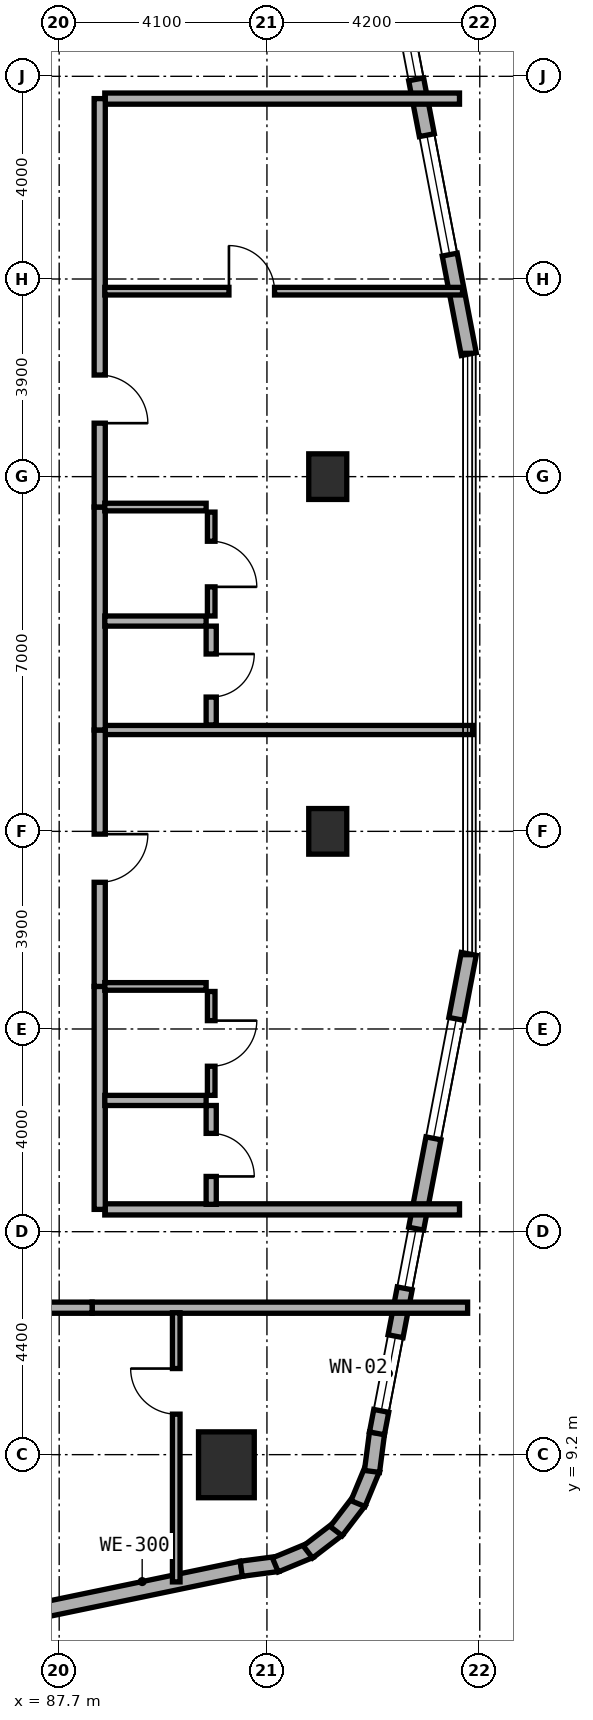
"""IFC4 building model, lengths in metres.
Left out: names, types, materials, properties, quantities, classifications, styles, units other than length and angle.
Written with IfcOpenShell. Run it as: python <this file> out.ifc"""

import sys

from ifc_helpers import new_model, si_unit, direction, frame, frame_2d, origin, origin_2d, place, context, subcontext, project, spatial, rectangle, extrude, element, fill, save


model = new_model("IFC4")
c1 = context("Model", 3, precision=1e-05, world=origin(), true_north=direction((0.0, 1.0)))
c2 = subcontext(c1, "Body", "Model", "MODEL_VIEW")
j1 = project(units=[si_unit("LENGTHUNIT", "METRE"), si_unit("PLANEANGLEUNIT", "RADIAN")], contexts=[c1])
p1 = place(None, origin())
s1 = spatial("IfcSite", under=j1, at=p1, CompositionType="ELEMENT")
p2 = place(p1, origin())
s2 = spatial("IfcBuilding", under=s1, at=p2, CompositionType="ELEMENT")
p3 = place(p2, frame((0.0, 0.0, 27.5)))
s3 = spatial("IfcBuildingStorey", under=s2, at=p3, CompositionType="ELEMENT", Elevation=27.5)
for number, where, z_axis, x_axis in (
    (1, (93.0, 21.5, 0.0), (0.0, 0.0, 1.0), (1.0, 0.0, 0.0)),
    (2, (93.0, 28.5, 0.0), (0.0, 0.0, 1.0), (1.0, 0.0, 0.0)),
):
    element("IfcColumn", number, at=place(p3, frame(where, z_axis=z_axis, x_axis=x_axis)), inside=s3, PredefinedType="COLUMN", context=c2, shape_type="SweptSolid", body=[
        extrude(rectangle(XDim=0.75, YDim=0.9, at=origin_2d()), origin(), (0.0, 0.0, 1.0), 3.5),
    ])
p4 = place(p3, frame((91.0, 9.0, 0.0), z_axis=(0.0, 0.0, 1.0), x_axis=(1.0, 0.0, 0.0)))
e3 = element("IfcColumn", 3, at=p4, inside=s3, PredefinedType="COLUMN", context=c2, shape_type="SweptSolid", body=[
    extrude(rectangle(XDim=1.1, YDim=1.3, at=origin_2d()), origin(), (0.0, 0.0, 1.0), 3.5),
])
p5 = place(p3, frame((82.594, 5.142, 0.0), z_axis=(0.0, 0.0, 1.0), x_axis=(0.979125485139, 0.203256695712, 0.0)))
e4 = element("IfcWall", 4, at=p5, inside=s3, PredefinedType="STANDARD", context=c2, shape_type="SweptSolid", body=[
    extrude(rectangle(XDim=8.89, YDim=0.3, at=frame_2d((4.445, 0.0))), origin(), (0.0, 0.0, 1.0), 3.25),
])
p6 = place(p5, frame((2.548, 0.0, 0.8)))
e5 = element("IfcOpeningElement", 5, at=p6, cuts=e4, PredefinedType="OPENING", context=c2, shape_type="SweptSolid", body=[
    extrude(rectangle(XDim=2.4, YDim=1.6, at=frame_2d((1.2, 0.8))), frame((0.0, 0.16, 0.0), z_axis=(0.0, -1.0, 0.0), x_axis=(1.0, 0.0, 0.0)), (0.0, 0.0, 1.0), 0.32),
])
p7 = place(p3, frame((91.293, 6.948, 0.0), z_axis=(0.0, 0.0, 1.0), x_axis=(0.991486167159, 0.13021205909, 0.0)))
e6 = element("IfcWall", 6, at=p7, inside=s3, PredefinedType="STANDARD", context=c2, shape_type="SweptSolid", body=[
    extrude(rectangle(XDim=0.729, YDim=0.3, at=frame_2d((0.365, 0.0))), origin(), (0.0, 0.0, 1.0), 3.25),
])
for number, where, z_axis, x_axis in (
    (7, (91.965, 7.024, 0.0), (0.0, 0.0, 1.0), (0.924, 0.384, 0.0)),
    (8, (92.609, 7.279, 0.0), (0.0, 0.0, 1.0), (0.794, 0.608, 0.0)),
    (9, (93.166, 7.691, 0.0), (0.0, 0.0, 1.0), (0.609, 0.793, 0.0)),
):
    element("IfcWall", number, at=place(p3, frame(where, z_axis=z_axis, x_axis=x_axis)), inside=s3, PredefinedType="STANDARD", context=c2, shape_type="SweptSolid", body=[
        extrude(rectangle(XDim=0.746, YDim=0.3, at=frame_2d((0.373, 0.0))), origin(), (0.0, 0.0, 1.0), 3.25),
    ])
p8 = place(p3, frame((93.596, 8.234, 0.0), z_axis=(0.0, 0.0, 1.0), x_axis=(0.383430326427, 0.923569805037, 0.0)))
e10 = element("IfcWall", 10, at=p8, inside=s3, PredefinedType="STANDARD", context=c2, shape_type="SweptSolid", body=[
    extrude(rectangle(XDim=0.746, YDim=0.3, at=frame_2d((0.373, 0.0))), origin(), (0.0, 0.0, 1.0), 3.25),
])
p9 = place(p3, frame((93.873, 8.869, 0.0), z_axis=(0.0, 0.0, 1.0), x_axis=(0.129339184068, 0.991600411186, 0.0)))
e11 = element("IfcWall", 11, at=p9, inside=s3, PredefinedType="STANDARD", context=c2, shape_type="SweptSolid", body=[
    extrude(rectangle(XDim=0.764, YDim=0.3, at=frame_2d((0.382, 0.0))), origin(), (0.0, 0.0, 1.0), 3.25),
])
p10 = place(p3, frame((93.971, 9.62, 0.0), z_axis=(0.0, 0.0, 1.0), x_axis=(0.188087874316, 0.982152203854, 0.0)))
e12 = element("IfcWall", 12, at=p10, inside=s3, PredefinedType="STANDARD", context=c2, shape_type="SweptSolid", body=[
    extrude(rectangle(XDim=9.634, YDim=0.3, at=frame_2d((4.817, 0.0))), origin(), (0.0, 0.0, 1.0), 3.25),
])
p11 = place(p10, frame((0.452, 0.0, 0.85)))
e13 = element("IfcOpeningElement", 13, at=p11, cuts=e12, PredefinedType="OPENING", context=c2, shape_type="SweptSolid", body=[
    extrude(rectangle(XDim=1.5, YDim=1.5, at=frame_2d((0.75, 0.75))), frame((0.0, 0.16, 0.0), z_axis=(0.0, -1.0, 0.0), x_axis=(1.0, 0.0, 0.0)), (0.0, 0.0, 1.0), 0.32),
])
p12 = place(p10, frame((2.913, 0.0, 0.85)))
e14 = element("IfcOpeningElement", 14, at=p12, cuts=e12, PredefinedType="OPENING", context=c2, shape_type="SweptSolid", body=[
    extrude(rectangle(XDim=1.2, YDim=1.5, at=frame_2d((0.6, 0.75))), frame((0.0, 0.16, 0.0), z_axis=(0.0, -1.0, 0.0), x_axis=(1.0, 0.0, 0.0)), (0.0, 0.0, 1.0), 0.32),
])
p13 = place(p10, frame((5.928, 0.0, 0.8)))
e15 = element("IfcOpeningElement", 15, at=p13, cuts=e12, PredefinedType="OPENING", context=c2, shape_type="SweptSolid", body=[
    extrude(rectangle(XDim=2.4, YDim=1.6, at=frame_2d((1.2, 0.8))), frame((0.0, 0.16, 0.0), z_axis=(0.0, -1.0, 0.0), x_axis=(1.0, 0.0, 0.0)), (0.0, 0.0, 1.0), 0.32),
])
p14 = place(p3, frame((95.783, 30.918, 0.0), z_axis=(0.0, 0.0, 1.0), x_axis=(-0.188087874316, 0.982152203854, 0.0)))
e16 = element("IfcWall", 16, at=p14, inside=s3, PredefinedType="STANDARD", context=c2, shape_type="SweptSolid", body=[
    extrude(rectangle(XDim=9.634, YDim=0.3, at=frame_2d((4.817, 0.0))), origin(), (0.0, 0.0, 1.0), 3.25),
])
p15 = place(p14, frame((1.999, 0.0, 0.8)))
e17 = element("IfcOpeningElement", 17, at=p15, cuts=e16, PredefinedType="OPENING", context=c2, shape_type="SweptSolid", body=[
    extrude(rectangle(XDim=2.4, YDim=1.6, at=frame_2d((1.2, 0.8))), frame((0.0, 0.16, 0.0), z_axis=(0.0, -1.0, 0.0), x_axis=(1.0, 0.0, 0.0)), (0.0, 0.0, 1.0), 0.32),
])
p16 = place(p14, frame((5.521, 0.0, 0.85)))
e18 = element("IfcOpeningElement", 18, at=p16, cuts=e16, PredefinedType="OPENING", context=c2, shape_type="SweptSolid", body=[
    extrude(rectangle(XDim=1.2, YDim=1.5, at=frame_2d((0.6, 0.75))), frame((0.0, 0.16, 0.0), z_axis=(0.0, -1.0, 0.0), x_axis=(1.0, 0.0, 0.0)), (0.0, 0.0, 1.0), 0.32),
])
p17 = place(p14, frame((7.682, 0.0, 0.85)))
e19 = element("IfcOpeningElement", 19, at=p17, cuts=e16, PredefinedType="OPENING", context=c2, shape_type="SweptSolid", body=[
    extrude(rectangle(XDim=1.5, YDim=1.5, at=frame_2d((0.75, 0.75))), frame((0.0, 0.16, 0.0), z_axis=(0.0, -1.0, 0.0), x_axis=(1.0, 0.0, 0.0)), (0.0, 0.0, 1.0), 0.32),
])
p18 = place(p3, frame((88.35, 12.1, 0.0), z_axis=(0.0, 0.0, 1.0), x_axis=(1.0, 0.0, 0.0)))
e20 = element("IfcWall", 20, at=p18, inside=s3, PredefinedType="SOLIDWALL", context=c2, shape_type="SweptSolid", body=[
    extrude(rectangle(XDim=7.41, YDim=0.22, at=frame_2d((3.705, 0.0))), origin(), (0.0, 0.0, 1.0), 2.865),
])
p19 = place(p3, frame((79.28, 12.1, 0.0), z_axis=(0.0, 0.0, 1.0), x_axis=(1.0, 0.0, 0.0)))
e21 = element("IfcWall", 21, at=p19, inside=s3, PredefinedType="SOLIDWALL", context=c2, shape_type="SweptSolid", body=[
    extrude(rectangle(XDim=9.07, YDim=0.22, at=frame_2d((4.535, 0.0))), origin(), (0.0, 0.0, 1.0), 2.725),
])
p20 = place(p19, frame((4.06, 0.0, 0.0)))
e22 = element("IfcOpeningElement", 22, at=p20, cuts=e21, PredefinedType="OPENING", context=c2, shape_type="SweptSolid", body=[
    extrude(rectangle(XDim=0.95, YDim=2.1, at=frame_2d((0.475, 1.05))), frame((0.0, 0.12, 0.0), z_axis=(0.0, -1.0, 0.0), x_axis=(1.0, 0.0, 0.0)), (0.0, 0.0, 1.0), 0.24),
])
p21 = place(p3, frame((90.01, 6.689, 0.0), z_axis=(0.0, 0.0, 1.0), x_axis=(0.0, 1.0, 0.0)))
e23 = element("IfcWall", 23, at=p21, inside=s3, PredefinedType="PARTITIONING", context=c2, shape_type="SweptSolid", body=[
    extrude(rectangle(XDim=5.311, YDim=0.15, at=frame_2d((2.656, 0.0))), origin(), (0.0, 0.0, 1.0), 2.865),
])
p22 = place(p21, frame((3.31, 0.0, 0.0)))
e24 = element("IfcOpeningElement", 24, at=p22, cuts=e23, PredefinedType="OPENING", context=c2, shape_type="SweptSolid", body=[
    extrude(rectangle(XDim=0.9, YDim=2.1, at=frame_2d((0.45, 1.05))), frame((0.0, 0.085, 0.0), z_axis=(0.0, -1.0, 0.0), x_axis=(1.0, 0.0, 0.0)), (0.0, 0.0, 1.0), 0.17),
])
for number, where, z_axis, x_axis in (
    (25, (88.6, 14.04, 0.0), (0.0, 0.0, 1.0), (1.0, 0.0, 0.0)),
    (26, (88.6, 35.96, 0.0), (0.0, 0.0, 1.0), (1.0, 0.0, 0.0)),
):
    element("IfcWall", number, at=place(p3, frame(where, z_axis=z_axis, x_axis=x_axis)), inside=s3, PredefinedType="SOLIDWALL", context=c2, shape_type="SweptSolid", body=[
        extrude(rectangle(XDim=7.0, YDim=0.22, at=frame_2d((3.5, 0.0))), origin(), (0.0, 0.0, 1.0), 2.865),
    ])
p23 = place(p3, frame((88.5, 23.5, 0.0), z_axis=(0.0, 0.0, 1.0), x_axis=(1.0, 0.0, 0.0)))
e27 = element("IfcWall", 27, at=p23, inside=s3, PredefinedType="SOLIDWALL", context=c2, shape_type="SweptSolid", body=[
    extrude(rectangle(XDim=7.36, YDim=0.18, at=frame_2d((3.68, 0.0))), origin(), (0.0, 0.0, 1.0), 2.865),
])
p24 = place(p3, frame((88.5, 14.04, 0.0), z_axis=(0.0, 0.0, 1.0), x_axis=(0.0, 1.0, 0.0)))
e28 = element("IfcWall", 28, at=p24, inside=s3, PredefinedType="SOLIDWALL", context=c2, shape_type="SweptSolid", body=[
    extrude(rectangle(XDim=4.4, YDim=0.22, at=frame_2d((2.2, 0.0))), origin(), (0.0, 0.0, 1.0), 3.22),
])
p25 = place(p3, frame((88.5, 18.44, 0.0), z_axis=(0.0, 0.0, 1.0), x_axis=(0.0, 1.0, 0.0)))
e29 = element("IfcWall", 29, at=p25, inside=s3, PredefinedType="SOLIDWALL", context=c2, shape_type="SweptSolid", body=[
    extrude(rectangle(XDim=5.06, YDim=0.22, at=frame_2d((2.53, 0.0))), origin(), (0.0, 0.0, 1.0), 2.725),
])
p26 = place(p25, frame((2.055, 0.0, 0.0)))
e30 = element("IfcOpeningElement", 30, at=p26, cuts=e29, PredefinedType="OPENING", context=c2, shape_type="SweptSolid", body=[
    extrude(rectangle(XDim=0.95, YDim=2.1, at=frame_2d((0.475, 1.05))), frame((0.0, 0.12, 0.0), z_axis=(0.0, -1.0, 0.0), x_axis=(1.0, 0.0, 0.0)), (0.0, 0.0, 1.0), 0.24),
])
p27 = place(p3, frame((88.6, 16.19, 0.0), z_axis=(0.0, 0.0, 1.0), x_axis=(1.0, 0.0, 0.0)))
e31 = element("IfcWall", 31, at=p27, inside=s3, PredefinedType="PLUMBINGWALL", context=c2, shape_type="SweptSolid", body=[
    extrude(rectangle(XDim=2.0, YDim=0.2, at=frame_2d((1.0, 0.0))), origin(), (0.0, 0.0, 1.0), 3.22),
])
p28 = place(p3, frame((88.6, 18.44, 0.0), z_axis=(0.0, 0.0, 1.0), x_axis=(1.0, 0.0, 0.0)))
e32 = element("IfcWall", 32, at=p28, inside=s3, PredefinedType="PARTITIONING", context=c2, shape_type="SweptSolid", body=[
    extrude(rectangle(XDim=2.0, YDim=0.15, at=frame_2d((1.0, 0.0))), origin(), (0.0, 0.0, 1.0), 3.22),
])
p29 = place(p3, frame((90.7, 14.14, 0.0), z_axis=(0.0, 0.0, 1.0), x_axis=(0.0, 1.0, 0.0)))
e33 = element("IfcWall", 33, at=p29, inside=s3, PredefinedType="PLUMBINGWALL", context=c2, shape_type="SweptSolid", body=[
    extrude(rectangle(XDim=1.95, YDim=0.2, at=frame_2d((0.975, 0.0))), origin(), (0.0, 0.0, 1.0), 3.22),
])
p30 = place(p29, frame((0.55, 0.0, 0.0)))
e34 = element("IfcOpeningElement", 34, at=p30, cuts=e33, PredefinedType="OPENING", context=c2, shape_type="SweptSolid", body=[
    extrude(rectangle(XDim=0.85, YDim=2.1, at=frame_2d((0.425, 1.05))), frame((0.0, 0.11, 0.0), z_axis=(0.0, -1.0, 0.0), x_axis=(1.0, 0.0, 0.0)), (0.0, 0.0, 1.0), 0.22),
])
p31 = place(p3, frame((90.7, 16.29, 0.0), z_axis=(0.0, 0.0, 1.0), x_axis=(0.0, 1.0, 0.0)))
e35 = element("IfcWall", 35, at=p31, inside=s3, PredefinedType="PARTITIONING", context=c2, shape_type="SweptSolid", body=[
    extrude(rectangle(XDim=2.05, YDim=0.15, at=frame_2d((1.025, 0.0))), origin(), (0.0, 0.0, 1.0), 3.22),
])
p32 = place(p31, frame((0.575, 0.0, 0.0)))
e36 = element("IfcOpeningElement", 36, at=p32, cuts=e35, PredefinedType="OPENING", context=c2, shape_type="SweptSolid", body=[
    extrude(rectangle(XDim=0.9, YDim=2.1, at=frame_2d((0.45, 1.05))), frame((0.0, 0.085, 0.0), z_axis=(0.0, -1.0, 0.0), x_axis=(1.0, 0.0, 0.0)), (0.0, 0.0, 1.0), 0.17),
])
p33 = place(p3, frame((88.5, 23.5, 0.0), z_axis=(0.0, 0.0, 1.0), x_axis=(0.0, 1.0, 0.0)))
e37 = element("IfcWall", 37, at=p33, inside=s3, PredefinedType="SOLIDWALL", context=c2, shape_type="SweptSolid", body=[
    extrude(rectangle(XDim=4.4, YDim=0.22, at=frame_2d((2.2, 0.0))), origin(), (0.0, 0.0, 1.0), 3.22),
])
p34 = place(p3, frame((88.5, 27.9, 0.0), z_axis=(0.0, 0.0, 1.0), x_axis=(0.0, 1.0, 0.0)))
e38 = element("IfcWall", 38, at=p34, inside=s3, PredefinedType="SOLIDWALL", context=c2, shape_type="SweptSolid", body=[
    extrude(rectangle(XDim=8.06, YDim=0.22, at=frame_2d((4.03, 0.0))), origin(), (0.0, 0.0, 1.0), 2.725),
])
p35 = place(p34, frame((1.655, 0.0, 0.0)))
e39 = element("IfcOpeningElement", 39, at=p35, cuts=e38, PredefinedType="OPENING", context=c2, shape_type="SweptSolid", body=[
    extrude(rectangle(XDim=0.95, YDim=2.1, at=frame_2d((0.475, 1.05))), frame((0.0, 0.12, 0.0), z_axis=(0.0, -1.0, 0.0), x_axis=(1.0, 0.0, 0.0)), (0.0, 0.0, 1.0), 0.24),
])
p36 = place(p3, frame((88.6, 32.16, 0.0), z_axis=(0.0, 0.0, 1.0), x_axis=(1.0, 0.0, 0.0)))
e40 = element("IfcWall", 40, at=p36, inside=s3, PredefinedType="PARTITIONING", context=c2, shape_type="SweptSolid", body=[
    extrude(rectangle(XDim=7.06, YDim=0.15, at=frame_2d((3.53, 0.0))), origin(), (0.0, 0.0, 1.0), 2.865),
])
p37 = place(p36, frame((2.45, 0.0, 0.0)))
e41 = element("IfcOpeningElement", 41, at=p37, cuts=e40, PredefinedType="OPENING", context=c2, shape_type="SweptSolid", body=[
    extrude(rectangle(XDim=0.9, YDim=2.1, at=frame_2d((0.45, 1.05))), frame((0.0, 0.085, 0.0), z_axis=(0.0, -1.0, 0.0), x_axis=(1.0, 0.0, 0.0)), (0.0, 0.0, 1.0), 0.17),
])
p38 = place(p3, frame((88.6, 25.65, 0.0), z_axis=(0.0, 0.0, 1.0), x_axis=(1.0, 0.0, 0.0)))
e42 = element("IfcWall", 42, at=p38, inside=s3, PredefinedType="PLUMBINGWALL", context=c2, shape_type="SweptSolid", body=[
    extrude(rectangle(XDim=2.0, YDim=0.2, at=frame_2d((1.0, 0.0))), origin(), (0.0, 0.0, 1.0), 3.22),
])
p39 = place(p3, frame((88.6, 27.9, 0.0), z_axis=(0.0, 0.0, 1.0), x_axis=(1.0, 0.0, 0.0)))
e43 = element("IfcWall", 43, at=p39, inside=s3, PredefinedType="PARTITIONING", context=c2, shape_type="SweptSolid", body=[
    extrude(rectangle(XDim=2.0, YDim=0.15, at=frame_2d((1.0, 0.0))), origin(), (0.0, 0.0, 1.0), 3.22),
])
p40 = place(p3, frame((90.7, 23.6, 0.0), z_axis=(0.0, 0.0, 1.0), x_axis=(0.0, 1.0, 0.0)))
e44 = element("IfcWall", 44, at=p40, inside=s3, PredefinedType="PLUMBINGWALL", context=c2, shape_type="SweptSolid", body=[
    extrude(rectangle(XDim=1.95, YDim=0.2, at=frame_2d((0.975, 0.0))), origin(), (0.0, 0.0, 1.0), 3.22),
])
p41 = place(p40, frame((0.55, 0.0, 0.0)))
e45 = element("IfcOpeningElement", 45, at=p41, cuts=e44, PredefinedType="OPENING", context=c2, shape_type="SweptSolid", body=[
    extrude(rectangle(XDim=0.85, YDim=2.1, at=frame_2d((0.425, 1.05))), frame((0.0, 0.11, 0.0), z_axis=(0.0, -1.0, 0.0), x_axis=(1.0, 0.0, 0.0)), (0.0, 0.0, 1.0), 0.22),
])
p42 = place(p3, frame((90.7, 25.75, 0.0), z_axis=(0.0, 0.0, 1.0), x_axis=(0.0, 1.0, 0.0)))
e46 = element("IfcWall", 46, at=p42, inside=s3, PredefinedType="PARTITIONING", context=c2, shape_type="SweptSolid", body=[
    extrude(rectangle(XDim=2.05, YDim=0.15, at=frame_2d((1.025, 0.0))), origin(), (0.0, 0.0, 1.0), 3.22),
])
p43 = place(p42, frame((0.575, 0.0, 0.0)))
e47 = element("IfcOpeningElement", 47, at=p43, cuts=e46, PredefinedType="OPENING", context=c2, shape_type="SweptSolid", body=[
    extrude(rectangle(XDim=0.9, YDim=2.1, at=frame_2d((0.45, 1.05))), frame((0.0, 0.085, 0.0), z_axis=(0.0, -1.0, 0.0), x_axis=(1.0, 0.0, 0.0)), (0.0, 0.0, 1.0), 0.17),
])
p44 = place(p11, origin())
e48 = element("IfcWindow", 48, at=p44, inside=s3, PartitioningType="SINGLE_PANEL", PredefinedType="WINDOW", context=c2, shape_type="SweptSolid", body=[
    extrude(rectangle(XDim=1.5, YDim=1.5, at=frame_2d((0.75, 0.75))), frame((0.0, 0.03, 0.0), z_axis=(0.0, -1.0, 0.0), x_axis=(1.0, 0.0, 0.0)), (0.0, 0.0, 1.0), 0.06),
])
fill(e13, e48)
p45 = place(p12, origin())
e49 = element("IfcWindow", 49, at=p45, inside=s3, PartitioningType="SINGLE_PANEL", PredefinedType="WINDOW", context=c2, shape_type="SweptSolid", body=[
    extrude(rectangle(XDim=1.2, YDim=1.5, at=frame_2d((0.6, 0.75))), frame((0.0, 0.03, 0.0), z_axis=(0.0, -1.0, 0.0), x_axis=(1.0, 0.0, 0.0)), (0.0, 0.0, 1.0), 0.06),
])
fill(e14, e49)
p46 = place(p13, origin())
e50 = element("IfcWindow", 50, at=p46, inside=s3, PartitioningType="SINGLE_PANEL", PredefinedType="WINDOW", context=c2, shape_type="SweptSolid", body=[
    extrude(rectangle(XDim=2.4, YDim=1.6, at=frame_2d((1.2, 0.8))), frame((0.0, 0.03, 0.0), z_axis=(0.0, -1.0, 0.0), x_axis=(1.0, 0.0, 0.0)), (0.0, 0.0, 1.0), 0.06),
])
fill(e15, e50)
p47 = place(p15, origin())
e51 = element("IfcWindow", 51, at=p47, inside=s3, PartitioningType="SINGLE_PANEL", PredefinedType="WINDOW", context=c2, shape_type="SweptSolid", body=[
    extrude(rectangle(XDim=2.4, YDim=1.6, at=frame_2d((1.2, 0.8))), frame((0.0, 0.03, 0.0), z_axis=(0.0, -1.0, 0.0), x_axis=(1.0, 0.0, 0.0)), (0.0, 0.0, 1.0), 0.06),
])
fill(e17, e51)
p48 = place(p16, origin())
e52 = element("IfcWindow", 52, at=p48, inside=s3, PartitioningType="SINGLE_PANEL", PredefinedType="WINDOW", context=c2, shape_type="SweptSolid", body=[
    extrude(rectangle(XDim=1.2, YDim=1.5, at=frame_2d((0.6, 0.75))), frame((0.0, 0.03, 0.0), z_axis=(0.0, -1.0, 0.0), x_axis=(1.0, 0.0, 0.0)), (0.0, 0.0, 1.0), 0.06),
])
fill(e18, e52)
p49 = place(p22, origin())
e53 = element("IfcDoor", 53, at=p49, inside=s3, OperationType="SINGLE_SWING_RIGHT", PredefinedType="DOOR", context=c2, shape_type="SweptSolid", body=[
    extrude(rectangle(XDim=0.9, YDim=2.1, at=frame_2d((0.45, 1.05))), frame((0.0, 0.025, 0.0), z_axis=(0.0, -1.0, 0.0), x_axis=(1.0, 0.0, 0.0)), (0.0, 0.0, 1.0), 0.05),
])
fill(e24, e53)
p50 = place(p26, frame((0.95, 0.0, 0.0), z_axis=(0.0, 0.0, 1.0), x_axis=(-1.0, 0.0, 0.0)))
e54 = element("IfcDoor", 54, at=p50, inside=s3, OperationType="SINGLE_SWING_LEFT", PredefinedType="DOOR", context=c2, shape_type="SweptSolid", body=[
    extrude(rectangle(XDim=0.95, YDim=2.1, at=frame_2d((0.475, 1.05))), frame((0.0, 0.025, 0.0), z_axis=(0.0, -1.0, 0.0), x_axis=(1.0, 0.0, 0.0)), (0.0, 0.0, 1.0), 0.05),
])
fill(e30, e54)
p51 = place(p30, frame((0.85, 0.0, 0.0), z_axis=(0.0, 0.0, 1.0), x_axis=(-1.0, 0.0, 0.0)))
e55 = element("IfcDoor", 55, at=p51, inside=s3, OperationType="SINGLE_SWING_RIGHT", PredefinedType="DOOR", context=c2, shape_type="SweptSolid", body=[
    extrude(rectangle(XDim=0.85, YDim=2.1, at=frame_2d((0.425, 1.05))), frame((0.0, 0.025, 0.0), z_axis=(0.0, -1.0, 0.0), x_axis=(1.0, 0.0, 0.0)), (0.0, 0.0, 1.0), 0.05),
])
fill(e34, e55)
p52 = place(p32, frame((0.9, 0.0, 0.0), z_axis=(0.0, 0.0, 1.0), x_axis=(-1.0, 0.0, 0.0)))
e56 = element("IfcDoor", 56, at=p52, inside=s3, OperationType="SINGLE_SWING_LEFT", PredefinedType="DOOR", context=c2, shape_type="SweptSolid", body=[
    extrude(rectangle(XDim=0.9, YDim=2.1, at=frame_2d((0.45, 1.05))), frame((0.0, 0.025, 0.0), z_axis=(0.0, -1.0, 0.0), x_axis=(1.0, 0.0, 0.0)), (0.0, 0.0, 1.0), 0.05),
])
fill(e36, e56)
p53 = place(p35, frame((0.95, 0.0, 0.0), z_axis=(0.0, 0.0, 1.0), x_axis=(-1.0, 0.0, 0.0)))
e57 = element("IfcDoor", 57, at=p53, inside=s3, OperationType="SINGLE_SWING_RIGHT", PredefinedType="DOOR", context=c2, shape_type="SweptSolid", body=[
    extrude(rectangle(XDim=0.95, YDim=2.1, at=frame_2d((0.475, 1.05))), frame((0.0, 0.025, 0.0), z_axis=(0.0, -1.0, 0.0), x_axis=(1.0, 0.0, 0.0)), (0.0, 0.0, 1.0), 0.05),
])
fill(e39, e57)
p54 = place(p37, origin())
e58 = element("IfcDoor", 58, at=p54, inside=s3, OperationType="SINGLE_SWING_LEFT", PredefinedType="DOOR", context=c2, shape_type="SweptSolid", body=[
    extrude(rectangle(XDim=0.9, YDim=2.1, at=frame_2d((0.45, 1.05))), frame((0.0, 0.025, 0.0), z_axis=(0.0, -1.0, 0.0), x_axis=(1.0, 0.0, 0.0)), (0.0, 0.0, 1.0), 0.05),
])
fill(e41, e58)
p55 = place(p41, frame((0.85, 0.0, 0.0), z_axis=(0.0, 0.0, 1.0), x_axis=(-1.0, 0.0, 0.0)))
e59 = element("IfcDoor", 59, at=p55, inside=s3, OperationType="SINGLE_SWING_LEFT", PredefinedType="DOOR", context=c2, shape_type="SweptSolid", body=[
    extrude(rectangle(XDim=0.85, YDim=2.1, at=frame_2d((0.425, 1.05))), frame((0.0, 0.025, 0.0), z_axis=(0.0, -1.0, 0.0), x_axis=(1.0, 0.0, 0.0)), (0.0, 0.0, 1.0), 0.05),
])
fill(e45, e59)
p56 = place(p43, frame((0.9, 0.0, 0.0), z_axis=(0.0, 0.0, 1.0), x_axis=(-1.0, 0.0, 0.0)))
e60 = element("IfcDoor", 60, at=p56, inside=s3, OperationType="SINGLE_SWING_RIGHT", PredefinedType="DOOR", context=c2, shape_type="SweptSolid", body=[
    extrude(rectangle(XDim=0.9, YDim=2.1, at=frame_2d((0.45, 1.05))), frame((0.0, 0.025, 0.0), z_axis=(0.0, -1.0, 0.0), x_axis=(1.0, 0.0, 0.0)), (0.0, 0.0, 1.0), 0.05),
])
fill(e47, e60)
save(model, sys.argv[1])
